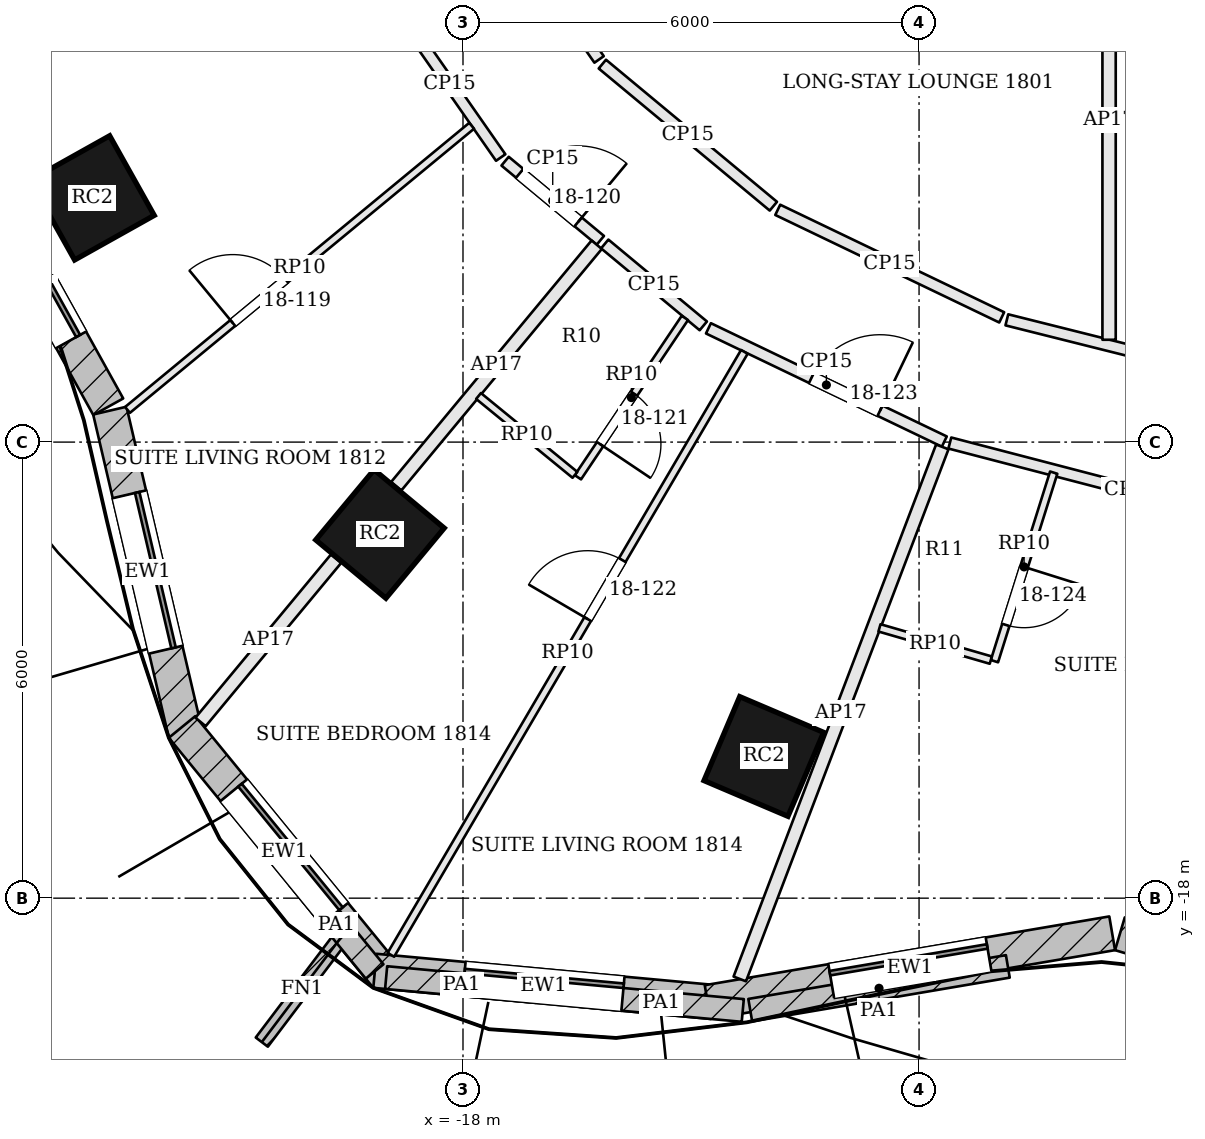
"""IFC4 building model, lengths in metres.
Left out: names, types, materials, properties, quantities, classifications, styles, units other than length and angle.
Written with IfcOpenShell. Run it as: python <this file> out.ifc"""

import sys

from ifc_helpers import new_model, si_unit, direction, frame, frame_2d, origin, origin_2d, place, context, subcontext, project, spatial, rectangle, extrude, element, fill, save


model = new_model("IFC4")
c1 = context("Model", 3, precision=1e-05, world=origin(), true_north=direction((0.0, 1.0)))
c2 = subcontext(c1, "Body", "Model", "MODEL_VIEW")
j1 = project(units=[si_unit("LENGTHUNIT", "METRE"), si_unit("PLANEANGLEUNIT", "RADIAN")], contexts=[c1])
p1 = place(None, origin())
s1 = spatial("IfcSite", under=j1, at=p1, CompositionType="ELEMENT")
p2 = place(p1, origin())
s2 = spatial("IfcBuilding", under=s1, at=p2, CompositionType="ELEMENT")
p3 = place(p2, frame((0.0, 0.0, 81.6)))
s3 = spatial("IfcBuildingStorey", under=s2, at=p3, CompositionType="ELEMENT", Elevation=81.6)
for number, where, z_axis, x_axis in (
    (1, (-22.879, -8.787, -0.7), (0.0, 0.0, 1.0), (0.489, -0.873, 0.0)),
    (2, (-19.092, -13.209, -0.7), (0.0, 0.0, 1.0), (0.769, -0.639, 0.0)),
    (3, (-14.042, -16.136, -0.7), (0.0, 0.0, 1.0), (0.92, -0.392, 0.0)),
):
    element("IfcColumn", number, at=place(p3, frame(where, z_axis=z_axis, x_axis=x_axis)), inside=s3, PredefinedType="COLUMN", context=c2, shape_type="SweptSolid", body=[
        extrude(rectangle(XDim=1.2, YDim=1.2, at=origin_2d()), origin(), (0.0, 0.0, 1.0), 4.3),
    ])
p4 = place(p3, frame((-24.662, -7.939, 0.0), z_axis=(0.0, 0.0, 1.0), x_axis=(0.485153910721, -0.874428775208, 0.0)))
e4 = element("IfcWall", 4, at=p4, inside=s3, PredefinedType="SOLIDWALL", context=c2, shape_type="SweptSolid", body=[
    extrude(rectangle(XDim=4.112, YDim=0.45, at=frame_2d((2.056, 0.0))), origin(), (0.0, 0.0, 1.0), 3.4),
])
p5 = place(p4, frame((1.006, 0.0, 0.9)))
e5 = element("IfcOpeningElement", 5, at=p5, cuts=e4, PredefinedType="OPENING", context=c2, shape_type="SweptSolid", body=[
    extrude(rectangle(XDim=2.1, YDim=2.0, at=frame_2d((1.05, 1.0))), frame((0.0, 0.235, 0.0), z_axis=(0.0, -1.0, 0.0), x_axis=(1.0, 0.0, 0.0)), (0.0, 0.0, 1.0), 0.47),
])
p6 = place(p3, frame((-22.646, -11.586, 0.0), z_axis=(0.0, 0.0, 1.0), x_axis=(0.227925124198, -0.973678662475, 0.0)))
e6 = element("IfcWall", 6, at=p6, inside=s3, PredefinedType="SOLIDWALL", context=c2, shape_type="SweptSolid", body=[
    extrude(rectangle(XDim=4.361, YDim=0.45, at=frame_2d((2.18, 0.0))), origin(), (0.0, 0.0, 1.0), 3.4),
])
p7 = place(p6, frame((1.13, 0.0, 0.9)))
e7 = element("IfcOpeningElement", 7, at=p7, cuts=e6, PredefinedType="OPENING", context=c2, shape_type="SweptSolid", body=[
    extrude(rectangle(XDim=2.1, YDim=2.0, at=frame_2d((1.05, 1.0))), frame((0.0, 0.235, 0.0), z_axis=(0.0, -1.0, 0.0), x_axis=(1.0, 0.0, 0.0)), (0.0, 0.0, 1.0), 0.47),
])
p8 = place(p3, frame((-21.696, -15.748, 0.0), z_axis=(0.0, 0.0, 1.0), x_axis=(0.632968710519, -0.774177377288, 0.0)))
e8 = element("IfcWall", 8, at=p8, inside=s3, PredefinedType="SOLIDWALL", context=c2, shape_type="SweptSolid", body=[
    extrude(rectangle(XDim=4.25, YDim=0.45, at=frame_2d((2.125, 0.0))), origin(), (0.0, 0.0, 1.0), 3.4),
])
p9 = place(p8, frame((1.075, 0.0, 0.9)))
e9 = element("IfcOpeningElement", 9, at=p9, cuts=e8, PredefinedType="OPENING", context=c2, shape_type="SweptSolid", body=[
    extrude(rectangle(XDim=2.1, YDim=2.0, at=frame_2d((1.05, 1.0))), frame((0.0, 0.235, 0.0), z_axis=(0.0, -1.0, 0.0), x_axis=(1.0, 0.0, 0.0)), (0.0, 0.0, 1.0), 0.47),
])
p10 = place(p3, frame((-19.159, -18.956, 0.0), z_axis=(0.0, 0.0, 1.0), x_axis=(0.995777399421, -0.091800712424, 0.0)))
e10 = element("IfcWall", 10, at=p10, inside=s3, PredefinedType="SOLIDWALL", context=c2, shape_type="SweptSolid", body=[
    extrude(rectangle(XDim=4.455, YDim=0.45, at=frame_2d((2.227, 0.0))), origin(), (0.0, 0.0, 1.0), 3.4),
])
p11 = place(p10, frame((1.177, 0.0, 0.9)))
e11 = element("IfcOpeningElement", 11, at=p11, cuts=e10, PredefinedType="OPENING", context=c2, shape_type="SweptSolid", body=[
    extrude(rectangle(XDim=2.1, YDim=2.0, at=frame_2d((1.05, 1.0))), frame((0.0, 0.235, 0.0), z_axis=(0.0, -1.0, 0.0), x_axis=(1.0, 0.0, 0.0)), (0.0, 0.0, 1.0), 0.47),
])
p12 = place(p3, frame((-14.782, -19.367, 0.0), z_axis=(0.0, 0.0, 1.0), x_axis=(0.98585584667, 0.167595493934, 0.0)))
e12 = element("IfcWall", 12, at=p12, inside=s3, PredefinedType="SOLIDWALL", context=c2, shape_type="SweptSolid", body=[
    extrude(rectangle(XDim=5.399, YDim=0.45, at=frame_2d((2.699, 0.0))), origin(), (0.0, 0.0, 1.0), 3.4),
])
p13 = place(p12, frame((1.649, 0.0, 0.9)))
e13 = element("IfcOpeningElement", 13, at=p13, cuts=e12, PredefinedType="OPENING", context=c2, shape_type="SweptSolid", body=[
    extrude(rectangle(XDim=2.1, YDim=2.0, at=frame_2d((1.05, 1.0))), frame((0.0, 0.235, 0.0), z_axis=(0.0, -1.0, 0.0), x_axis=(1.0, 0.0, 0.0)), (0.0, 0.0, 1.0), 0.47),
])
p14 = place(p3, frame((-9.357, -18.469, 0.0), z_axis=(0.0, 0.0, 1.0), x_axis=(0.958524054629, -0.285011643091, 0.0)))
e14 = element("IfcWall", 14, at=p14, inside=s3, PredefinedType="SOLIDWALL", context=c2, shape_type="SweptSolid", body=[
    extrude(rectangle(XDim=2.637, YDim=0.45, at=frame_2d((1.319, 0.0))), origin(), (0.0, 0.0, 1.0), 3.4),
])
p15 = place(p14, frame((0.269, 0.0, 0.9)))
e15 = element("IfcOpeningElement", 15, at=p15, cuts=e14, PredefinedType="OPENING", context=c2, shape_type="SweptSolid", body=[
    extrude(rectangle(XDim=2.1, YDim=2.0, at=frame_2d((1.05, 1.0))), frame((0.0, 0.235, 0.0), z_axis=(0.0, -1.0, 0.0), x_axis=(1.0, 0.0, 0.0)), (0.0, 0.0, 1.0), 0.47),
])
p16 = place(p3, frame((-19.591, -18.498, 0.0), z_axis=(0.0, 0.0, 1.0), x_axis=(-0.603387525063, -0.797448114048, 0.0)))
e16 = element("IfcWall", 16, at=p16, inside=s3, PredefinedType="SOLIDWALL", context=c2, shape_type="SweptSolid", body=[
    extrude(rectangle(XDim=1.75, YDim=0.2, at=frame_2d((0.875, 0.0))), origin(), (0.0, 0.0, 1.0), 3.4),
])
p17 = place(p3, frame((-20.168, -17.734, 3.6), z_axis=(0.0, 0.0, 1.0), x_axis=(0.632995189145, -0.774155727564, 0.0)))
e17 = element("IfcWall", 17, at=p17, inside=s3, PredefinedType="PARAPET", context=c2, shape_type="SweptSolid", body=[
    extrude(rectangle(XDim=1.589, YDim=0.3, at=frame_2d((0.795, 0.0))), origin(), (0.0, 0.0, 1.0), 1.1),
])
p18 = place(p3, frame((-19.011, -19.045, 3.6), z_axis=(0.0, 0.0, 1.0), x_axis=(0.995779953678, -0.09177300176, 0.0)))
e18 = element("IfcWall", 18, at=p18, inside=s3, PredefinedType="PARAPET", context=c2, shape_type="SweptSolid", body=[
    extrude(rectangle(XDim=1.992, YDim=0.3, at=frame_2d((0.996, 0.0))), origin(), (0.0, 0.0, 1.0), 1.1),
])
p19 = place(p3, frame((-16.462, -19.28, 3.6), z_axis=(0.0, 0.0, 1.0), x_axis=(0.995778015376, -0.091794030816, 0.0)))
e19 = element("IfcWall", 19, at=p19, inside=s3, PredefinedType="PARAPET", context=c2, shape_type="SweptSolid", body=[
    extrude(rectangle(XDim=2.152, YDim=0.3, at=frame_2d((1.076, 0.0))), origin(), (0.0, 0.0, 1.0), 1.1),
])
p20 = place(p3, frame((-14.221, -19.473, 3.6), z_axis=(0.0, 0.0, 1.0), x_axis=(0.985864880964, 0.167542342353, 0.0)))
e20 = element("IfcWall", 20, at=p20, inside=s3, PredefinedType="PARAPET", context=c2, shape_type="SweptSolid", body=[
    extrude(rectangle(XDim=3.438, YDim=0.3, at=frame_2d((1.719, 0.0))), origin(), (0.0, 0.0, 1.0), 1.1),
])
p21 = place(p3, frame((-18.851, -6.325, 0.0), z_axis=(0.0, 0.0, 1.0), x_axis=(0.572090775968, -0.820190309656, 0.0)))
e21 = element("IfcWall", 21, at=p21, inside=s3, PredefinedType="PARTITIONING", context=c2, shape_type="SweptSolid", body=[
    extrude(rectangle(XDim=2.355, YDim=0.15, at=frame_2d((1.177, 0.0))), origin(), (0.0, 0.0, 1.0), 2.784),
])
p22 = place(p3, frame((-17.446, -8.304, 0.0), z_axis=(0.0, 0.0, 1.0), x_axis=(0.769202835614, -0.639004693006, 0.0)))
e22 = element("IfcWall", 22, at=p22, inside=s3, PredefinedType="PARTITIONING", context=c2, shape_type="SweptSolid", body=[
    extrude(rectangle(XDim=1.629, YDim=0.15, at=frame_2d((0.815, 0.0))), origin(), (0.0, 0.0, 1.0), 2.784),
])
p23 = place(p22, frame((0.25, 0.0, 0.0)))
e23 = element("IfcOpeningElement", 23, at=p23, cuts=e22, PredefinedType="OPENING", context=c2, shape_type="SweptSolid", body=[
    extrude(rectangle(XDim=1.0, YDim=2.1, at=frame_2d((0.5, 1.05))), frame((0.0, 0.085, 0.0), z_axis=(0.0, -1.0, 0.0), x_axis=(1.0, 0.0, 0.0)), (0.0, 0.0, 1.0), 0.17),
])
p24 = place(p3, frame((-21.453, -15.682, 0.0), z_axis=(0.0, 0.0, 1.0), x_axis=(0.638677193702, 0.769474783371, 0.0)))
e24 = element("IfcWall", 24, at=p24, inside=s3, PredefinedType="PARTITIONING", context=c2, shape_type="SweptSolid", body=[
    extrude(rectangle(XDim=2.791, YDim=0.175, at=frame_2d((1.395, 0.0))), origin(), (0.0, 0.0, 1.0), 2.784),
])
p25 = place(p3, frame((-18.878, -12.58, 0.0), z_axis=(0.0, 0.0, 1.0), x_axis=(0.638746790079, 0.769417011876, 0.0)))
e25 = element("IfcWall", 25, at=p25, inside=s3, PredefinedType="PARTITIONING", context=c2, shape_type="SweptSolid", body=[
    extrude(rectangle(XDim=4.129, YDim=0.175, at=frame_2d((2.064, 0.0))), origin(), (0.0, 0.0, 1.0), 2.784),
])
p26 = place(p3, frame((-16.135, -9.393, 0.0), z_axis=(0.0, 0.0, 1.0), x_axis=(0.769193658028, -0.639015740376, 0.0)))
e26 = element("IfcWall", 26, at=p26, inside=s3, PredefinedType="PARTITIONING", context=c2, shape_type="SweptSolid", body=[
    extrude(rectangle(XDim=1.686, YDim=0.15, at=frame_2d((0.843, 0.0))), origin(), (0.0, 0.0, 1.0), 2.784),
])
p27 = place(p3, frame((-14.771, -10.503, 0.0), z_axis=(0.0, 0.0, 1.0), x_axis=(0.901503135339, -0.432772569573, 0.0)))
e27 = element("IfcWall", 27, at=p27, inside=s3, PredefinedType="PARTITIONING", context=c2, shape_type="SweptSolid", body=[
    extrude(rectangle(XDim=3.442, YDim=0.15, at=frame_2d((1.721, 0.0))), origin(), (0.0, 0.0, 1.0), 2.784),
])
p28 = place(p27, frame((1.504, 0.0, 0.0)))
e28 = element("IfcOpeningElement", 28, at=p28, cuts=e27, PredefinedType="OPENING", context=c2, shape_type="SweptSolid", body=[
    extrude(rectangle(XDim=1.0, YDim=2.1, at=frame_2d((0.5, 1.05))), frame((0.0, 0.085, 0.0), z_axis=(0.0, -1.0, 0.0), x_axis=(1.0, 0.0, 0.0)), (0.0, 0.0, 1.0), 0.17),
])
p29 = place(p3, frame((-14.359, -19.063, 0.0), z_axis=(0.0, 0.0, 1.0), x_axis=(0.355741824807, 0.934584268048, 0.0)))
e29 = element("IfcWall", 29, at=p29, inside=s3, PredefinedType="PARTITIONING", context=c2, shape_type="SweptSolid", body=[
    extrude(rectangle(XDim=7.49, YDim=0.175, at=frame_2d((3.745, 0.0))), origin(), (0.0, 0.0, 1.0), 2.784),
])
p30 = place(p3, frame((-11.595, -12.012, 0.0), z_axis=(0.0, 0.0, 1.0), x_axis=(0.967696436642, -0.252118239146, 0.0)))
e30 = element("IfcWall", 30, at=p30, inside=s3, PredefinedType="PARTITIONING", context=c2, shape_type="SweptSolid", body=[
    extrude(rectangle(XDim=4.91, YDim=0.15, at=frame_2d((2.455, 0.0))), origin(), (0.0, 0.0, 1.0), 2.784),
])
p31 = place(p3, frame((-6.617, -11.451, 0.0), z_axis=(0.0, 0.0, 1.0), x_axis=(-0.969987441267, 0.243155020069, 0.0)))
e31 = element("IfcWall", 31, at=p31, inside=s3, PredefinedType="PARTITIONING", context=c2, shape_type="SweptSolid", body=[
    extrude(rectangle(XDim=4.359, YDim=0.15, at=frame_2d((2.179, 0.0))), origin(), (0.0, 0.0, 1.0), 2.784),
])
p32 = place(p3, frame((-10.913, -10.359, 0.0), z_axis=(0.0, 0.0, 1.0), x_axis=(-0.90149741277, 0.432784489982, 0.0)))
e32 = element("IfcWall", 32, at=p32, inside=s3, PredefinedType="PARTITIONING", context=c2, shape_type="SweptSolid", body=[
    extrude(rectangle(XDim=3.269, YDim=0.15, at=frame_2d((1.634, 0.0))), origin(), (0.0, 0.0, 1.0), 2.784),
])
p33 = place(p3, frame((-13.917, -8.896, 0.0), z_axis=(0.0, 0.0, 1.0), x_axis=(-0.769130409479, 0.639091866021, 0.0)))
e33 = element("IfcWall", 33, at=p33, inside=s3, PredefinedType="PARTITIONING", context=c2, shape_type="SweptSolid", body=[
    extrude(rectangle(XDim=2.925, YDim=0.15, at=frame_2d((1.462, 0.0))), origin(), (0.0, 0.0, 1.0), 2.784),
])
p34 = place(p3, frame((-16.209, -6.966, 0.0), z_axis=(0.0, 0.0, 1.0), x_axis=(-0.572051367607, 0.820217795966, 0.0)))
e34 = element("IfcWall", 34, at=p34, inside=s3, PredefinedType="PARTITIONING", context=c2, shape_type="SweptSolid", body=[
    extrude(rectangle(XDim=1.848, YDim=0.15, at=frame_2d((0.924, 0.0))), origin(), (0.0, 0.0, 1.0), 2.784),
])
p35 = place(p3, frame((-22.414, -11.576, 0.0), z_axis=(0.0, 0.0, 1.0), x_axis=(0.771144598581, 0.636660041214, 0.0)))
e35 = element("IfcWall", 35, at=p35, inside=s3, PredefinedType="PARTITIONING", context=c2, shape_type="SweptSolid", body=[
    extrude(rectangle(XDim=5.871, YDim=0.1, at=frame_2d((2.936, 0.0))), origin(), (0.0, 0.0, 1.0), 2.784),
])
p36 = place(p35, frame((1.796, 0.0, 0.0)))
e36 = element("IfcOpeningElement", 36, at=p36, cuts=e35, PredefinedType="OPENING", context=c2, shape_type="SweptSolid", body=[
    extrude(rectangle(XDim=0.9, YDim=2.4, at=frame_2d((0.45, 1.2))), frame((0.0, 0.06, 0.0), z_axis=(0.0, -1.0, 0.0), x_axis=(1.0, 0.0, 0.0)), (0.0, 0.0, 1.0), 0.12),
])
p37 = place(p3, frame((-18.949, -18.745, 0.0), z_axis=(0.0, 0.0, 1.0), x_axis=(0.505730402321, 0.862691578821, 0.0)))
e37 = element("IfcWall", 37, at=p37, inside=s3, PredefinedType="PARTITIONING", context=c2, shape_type="SweptSolid", body=[
    extrude(rectangle(XDim=9.195, YDim=0.1, at=frame_2d((4.597, 0.0))), origin(), (0.0, 0.0, 1.0), 2.784),
])
p38 = place(p37, frame((5.12, 0.0, 0.0)))
e38 = element("IfcOpeningElement", 38, at=p38, cuts=e37, PredefinedType="OPENING", context=c2, shape_type="SweptSolid", body=[
    extrude(rectangle(XDim=0.9, YDim=2.4, at=frame_2d((0.45, 1.2))), frame((0.0, 0.06, 0.0), z_axis=(0.0, -1.0, 0.0), x_axis=(1.0, 0.0, 0.0)), (0.0, 0.0, 1.0), 0.12),
])
p39 = place(p3, frame((-15.081, -10.366, 0.0), z_axis=(0.0, 0.0, 1.0), x_axis=(-0.557375152116, -0.830260766147, 0.0)))
e39 = element("IfcWall", 39, at=p39, inside=s3, PredefinedType="PARTITIONING", context=c2, shape_type="SweptSolid", body=[
    extrude(rectangle(XDim=2.525, YDim=0.1, at=frame_2d((1.262, 0.0))), origin(), (0.0, 0.0, 1.0), 2.784),
])
p40 = place(p39, frame((1.2, 0.0, 0.0)))
e40 = element("IfcOpeningElement", 40, at=p40, cuts=e39, PredefinedType="OPENING", context=c2, shape_type="SweptSolid", body=[
    extrude(rectangle(XDim=0.8, YDim=2.1, at=frame_2d((0.4, 1.05))), frame((0.0, 0.06, 0.0), z_axis=(0.0, -1.0, 0.0), x_axis=(1.0, 0.0, 0.0)), (0.0, 0.0, 1.0), 0.12),
])
p41 = place(p3, frame((-16.527, -12.431, 0.0), z_axis=(0.0, 0.0, 1.0), x_axis=(-0.774063507304, 0.63310795814, 0.0)))
e41 = element("IfcWall", 41, at=p41, inside=s3, PredefinedType="PARTITIONING", context=c2, shape_type="SweptSolid", body=[
    extrude(rectangle(XDim=1.638, YDim=0.1, at=frame_2d((0.819, 0.0))), origin(), (0.0, 0.0, 1.0), 2.784),
])
p42 = place(p3, frame((-10.229, -12.402, 0.0), z_axis=(0.0, 0.0, 1.0), x_axis=(-0.299899842135, -0.95397069383, 0.0)))
e42 = element("IfcWall", 42, at=p42, inside=s3, PredefinedType="PARTITIONING", context=c2, shape_type="SweptSolid", body=[
    extrude(rectangle(XDim=2.6, YDim=0.1, at=frame_2d((1.3, 0.0))), origin(), (0.0, 0.0, 1.0), 2.784),
])
p43 = place(p42, frame((1.3, 0.0, 0.0)))
e43 = element("IfcOpeningElement", 43, at=p43, cuts=e42, PredefinedType="OPENING", context=c2, shape_type="SweptSolid", body=[
    extrude(rectangle(XDim=0.8, YDim=2.1, at=frame_2d((0.4, 1.05))), frame((0.0, 0.06, 0.0), z_axis=(0.0, -1.0, 0.0), x_axis=(1.0, 0.0, 0.0)), (0.0, 0.0, 1.0), 0.12),
])
p44 = place(p3, frame((-11.056, -14.868, 0.0), z_axis=(0.0, 0.0, 1.0), x_axis=(-0.960532741446, 0.278166950966, 0.0)))
e44 = element("IfcWall", 44, at=p44, inside=s3, PredefinedType="PARTITIONING", context=c2, shape_type="SweptSolid", body=[
    extrude(rectangle(XDim=1.524, YDim=0.1, at=frame_2d((0.762, 0.0))), origin(), (0.0, 0.0, 1.0), 2.784),
])
p45 = place(p3, frame((-9.5, -10.654, 0.0), z_axis=(0.0, 0.0, 1.0), x_axis=(0.0, 1.0, 0.0)))
e45 = element("IfcWall", 45, at=p45, inside=s3, PredefinedType="PARTITIONING", context=c2, shape_type="SweptSolid", body=[
    extrude(rectangle(XDim=5.779, YDim=0.175, at=frame_2d((2.889, 0.0))), origin(), (0.0, 0.0, 1.0), 2.784),
])
p46 = place(p5, origin())
e46 = element("IfcWindow", 46, at=p46, inside=s3, PartitioningType="SINGLE_PANEL", PredefinedType="WINDOW", context=c2, shape_type="SweptSolid", body=[
    extrude(rectangle(XDim=2.1, YDim=2.0, at=frame_2d((1.05, 1.0))), frame((0.0, 0.135, 0.0), z_axis=(0.0, -1.0, 0.0), x_axis=(1.0, 0.0, 0.0)), (0.0, 0.0, 1.0), 0.06),
])
fill(e5, e46)
p47 = place(p7, origin())
e47 = element("IfcWindow", 47, at=p47, inside=s3, PartitioningType="SINGLE_PANEL", PredefinedType="WINDOW", context=c2, shape_type="SweptSolid", body=[
    extrude(rectangle(XDim=2.1, YDim=2.0, at=frame_2d((1.05, 1.0))), frame((0.0, 0.135, 0.0), z_axis=(0.0, -1.0, 0.0), x_axis=(1.0, 0.0, 0.0)), (0.0, 0.0, 1.0), 0.06),
])
fill(e7, e47)
p48 = place(p9, origin())
e48 = element("IfcWindow", 48, at=p48, inside=s3, PartitioningType="SINGLE_PANEL", PredefinedType="WINDOW", context=c2, shape_type="SweptSolid", body=[
    extrude(rectangle(XDim=2.1, YDim=2.0, at=frame_2d((1.05, 1.0))), frame((0.0, 0.135, 0.0), z_axis=(0.0, -1.0, 0.0), x_axis=(1.0, 0.0, 0.0)), (0.0, 0.0, 1.0), 0.06),
])
fill(e9, e48)
p49 = place(p11, origin())
e49 = element("IfcWindow", 49, at=p49, inside=s3, PartitioningType="SINGLE_PANEL", PredefinedType="WINDOW", context=c2, shape_type="SweptSolid", body=[
    extrude(rectangle(XDim=2.1, YDim=2.0, at=frame_2d((1.05, 1.0))), frame((0.0, 0.135, 0.0), z_axis=(0.0, -1.0, 0.0), x_axis=(1.0, 0.0, 0.0)), (0.0, 0.0, 1.0), 0.06),
])
fill(e11, e49)
p50 = place(p13, origin())
e50 = element("IfcWindow", 50, at=p50, inside=s3, PartitioningType="SINGLE_PANEL", PredefinedType="WINDOW", context=c2, shape_type="SweptSolid", body=[
    extrude(rectangle(XDim=2.1, YDim=2.0, at=frame_2d((1.05, 1.0))), frame((0.0, 0.135, 0.0), z_axis=(0.0, -1.0, 0.0), x_axis=(1.0, 0.0, 0.0)), (0.0, 0.0, 1.0), 0.06),
])
fill(e13, e50)
p51 = place(p36, origin())
e51 = element("IfcDoor", 51, at=p51, inside=s3, OperationType="SINGLE_SWING_LEFT", PredefinedType="DOOR", context=c2, shape_type="SweptSolid", body=[
    extrude(rectangle(XDim=0.9, YDim=2.4, at=frame_2d((0.45, 1.2))), frame((0.0, 0.025, 0.0), z_axis=(0.0, -1.0, 0.0), x_axis=(1.0, 0.0, 0.0)), (0.0, 0.0, 1.0), 0.05),
])
fill(e36, e51)
p52 = place(p23, origin())
e52 = element("IfcDoor", 52, at=p52, inside=s3, OperationType="SINGLE_SWING_RIGHT", PredefinedType="DOOR", context=c2, shape_type="SweptSolid", body=[
    extrude(rectangle(XDim=1.0, YDim=2.1, at=frame_2d((0.5, 1.05))), frame((0.0, 0.025, 0.0), z_axis=(0.0, -1.0, 0.0), x_axis=(1.0, 0.0, 0.0)), (0.0, 0.0, 1.0), 0.05),
])
fill(e23, e52)
p53 = place(p40, origin())
e53 = element("IfcDoor", 53, at=p53, inside=s3, OperationType="SINGLE_SWING_RIGHT", PredefinedType="DOOR", context=c2, shape_type="SweptSolid", body=[
    extrude(rectangle(XDim=0.8, YDim=2.1, at=frame_2d((0.4, 1.05))), frame((0.0, 0.025, 0.0), z_axis=(0.0, -1.0, 0.0), x_axis=(1.0, 0.0, 0.0)), (0.0, 0.0, 1.0), 0.05),
])
fill(e40, e53)
p54 = place(p38, origin())
e54 = element("IfcDoor", 54, at=p54, inside=s3, OperationType="SINGLE_SWING_LEFT", PredefinedType="DOOR", context=c2, shape_type="SweptSolid", body=[
    extrude(rectangle(XDim=0.9, YDim=2.4, at=frame_2d((0.45, 1.2))), frame((0.0, 0.025, 0.0), z_axis=(0.0, -1.0, 0.0), x_axis=(1.0, 0.0, 0.0)), (0.0, 0.0, 1.0), 0.05),
])
fill(e38, e54)
p55 = place(p28, origin())
e55 = element("IfcDoor", 55, at=p55, inside=s3, OperationType="SINGLE_SWING_RIGHT", PredefinedType="DOOR", context=c2, shape_type="SweptSolid", body=[
    extrude(rectangle(XDim=1.0, YDim=2.1, at=frame_2d((0.5, 1.05))), frame((0.0, 0.025, 0.0), z_axis=(0.0, -1.0, 0.0), x_axis=(1.0, 0.0, 0.0)), (0.0, 0.0, 1.0), 0.05),
])
fill(e28, e55)
p56 = place(p43, origin())
e56 = element("IfcDoor", 56, at=p56, inside=s3, OperationType="SINGLE_SWING_LEFT", PredefinedType="DOOR", context=c2, shape_type="SweptSolid", body=[
    extrude(rectangle(XDim=0.8, YDim=2.1, at=frame_2d((0.4, 1.05))), frame((0.0, 0.025, 0.0), z_axis=(0.0, -1.0, 0.0), x_axis=(1.0, 0.0, 0.0)), (0.0, 0.0, 1.0), 0.05),
])
fill(e43, e56)
save(model, sys.argv[1])
